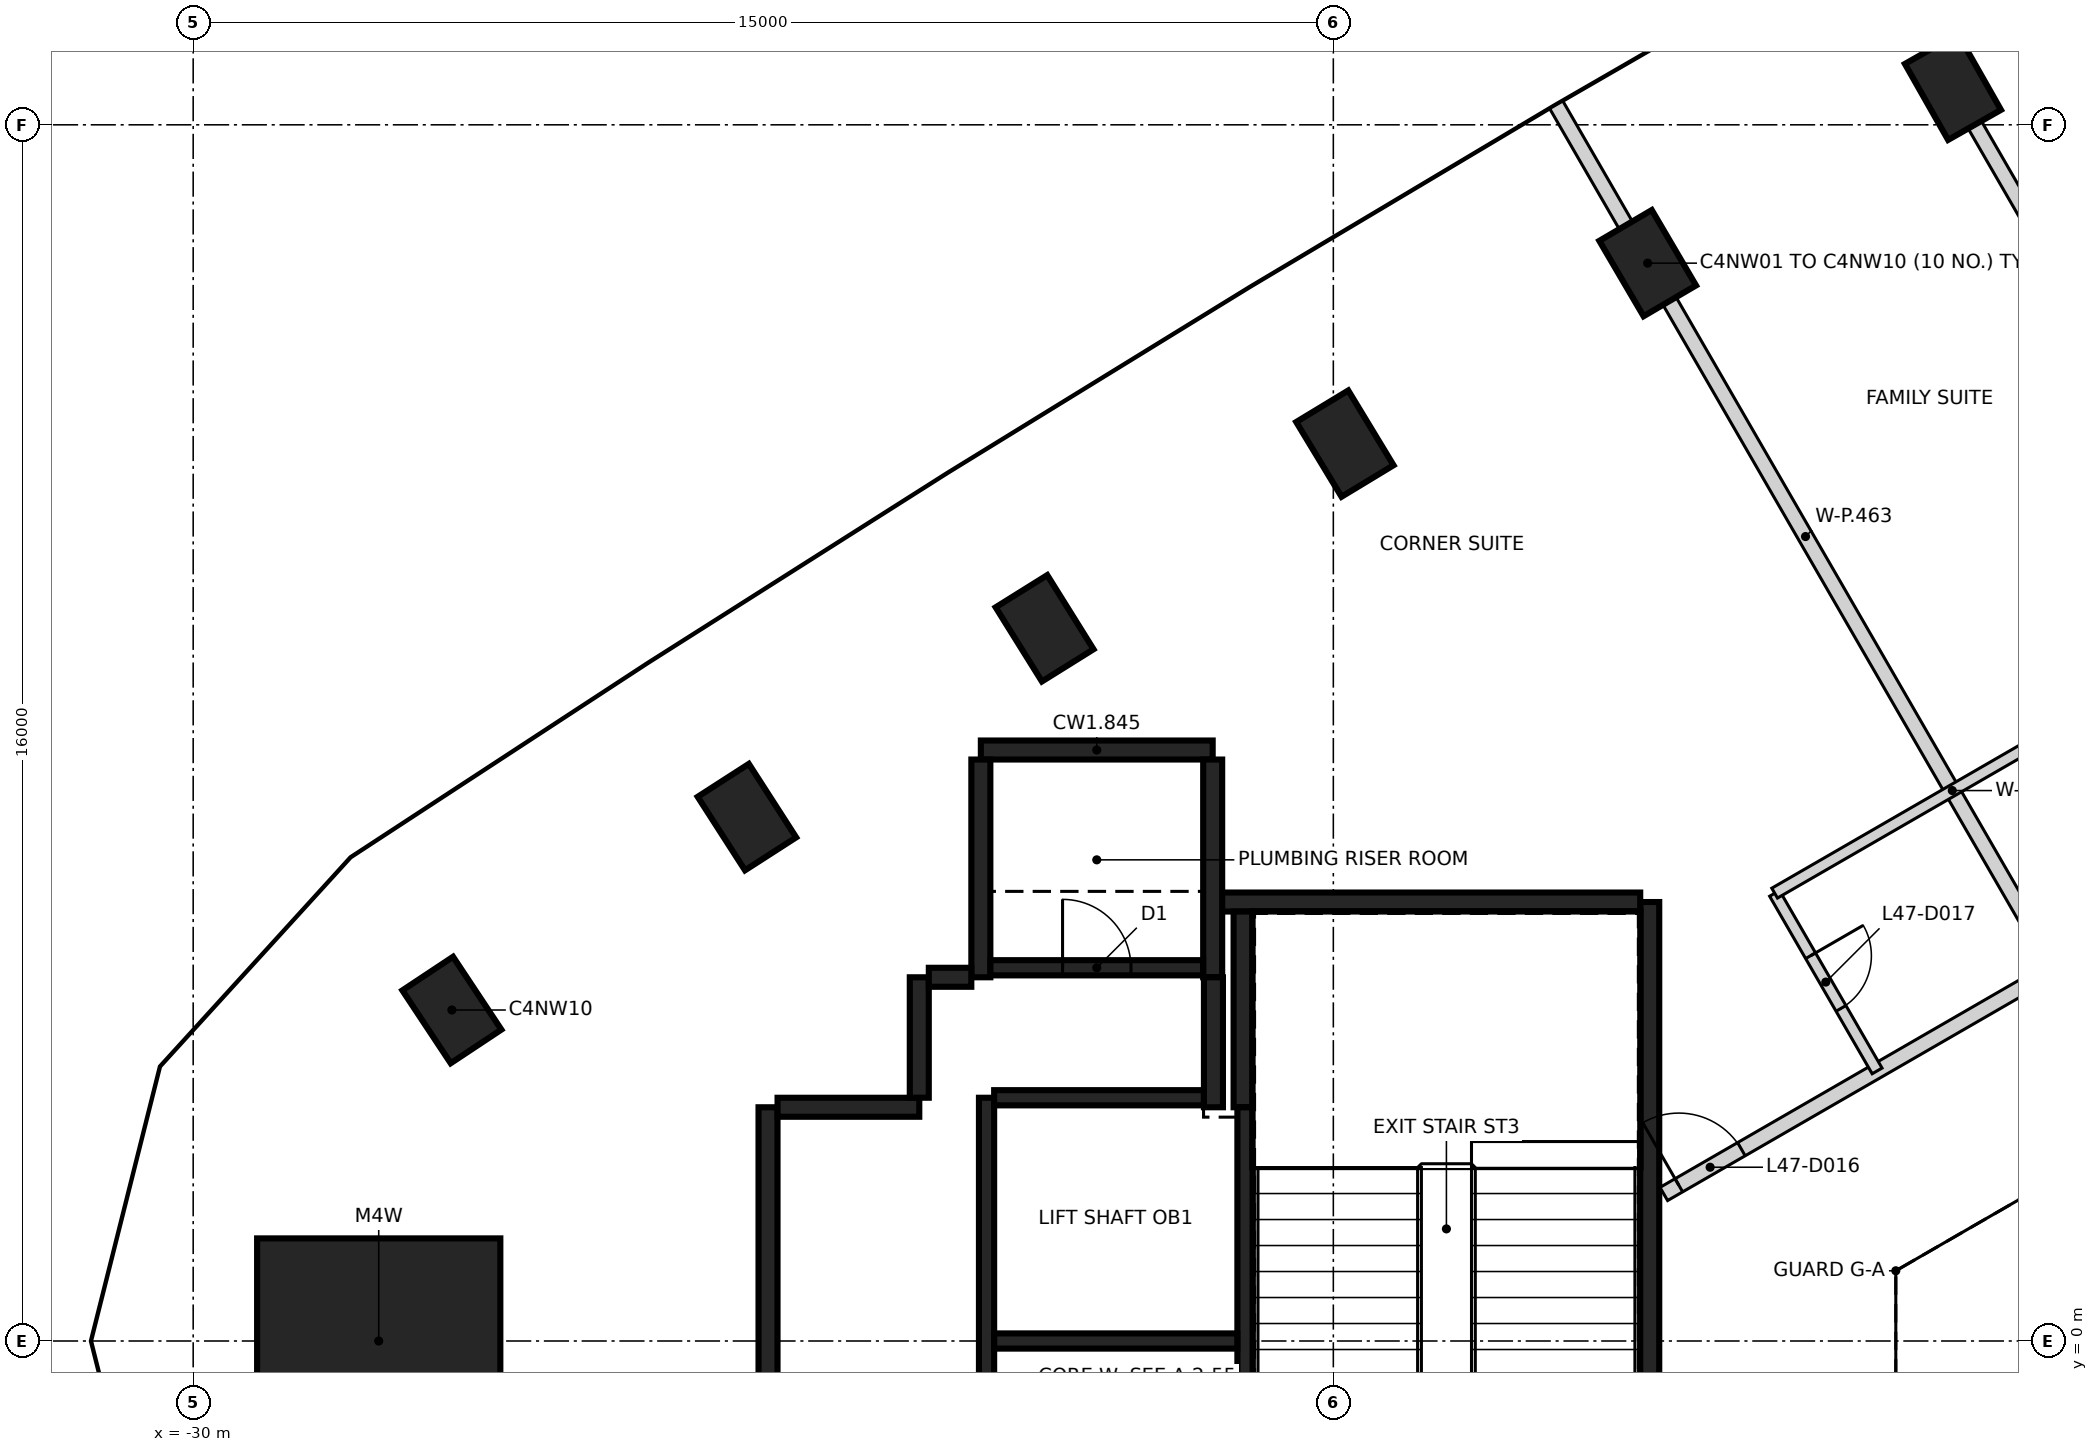
"""IFC4 building model, lengths in metres.
Left out: names, types, materials, properties, quantities, classifications, styles, units other than length and angle.
Written with IfcOpenShell. Run it as: python <this file> out.ifc"""

import sys

from ifc_helpers import new_model, si_unit, direction, frame, frame_2d, origin, origin_2d, place, context, subcontext, project, spatial, rectangle, extrude, element, fill, save


model = new_model("IFC4")
c1 = context("Model", 3, precision=1e-05, world=origin(), true_north=direction((0.0, 1.0)))
c2 = subcontext(c1, "Body", "Model", "MODEL_VIEW")
j1 = project(units=[si_unit("LENGTHUNIT", "METRE"), si_unit("PLANEANGLEUNIT", "RADIAN")], contexts=[c1])
p1 = place(None, origin())
s1 = spatial("IfcSite", under=j1, at=p1, CompositionType="ELEMENT")
p2 = place(p1, origin())
s2 = spatial("IfcBuilding", under=s1, at=p2, CompositionType="ELEMENT")
p3 = place(p2, frame((0.0, 0.0, 190.0)))
s3 = spatial("IfcBuildingStorey", under=s2, at=p3, CompositionType="ELEMENT", Elevation=190.0)
for number, where, z_axis, x_axis in (
    (1, (-6.848, 16.499, -0.35), (0.0, 0.0, 1.0), (-0.494, 0.87, 0.0)),
    (2, (-10.864, 14.18, -0.35), (0.0, 0.0, 1.0), (-0.506, 0.862, 0.0)),
    (3, (-14.848, 11.806, -0.35), (0.0, 0.0, 1.0), (-0.518, 0.855, 0.0)),
    (4, (-18.799, 9.376, -0.35), (0.0, 0.0, 1.0), (-0.529, 0.848, 0.0)),
    (5, (-22.715, 6.892, -0.35), (0.0, 0.0, 1.0), (-0.541, 0.841, 0.0)),
    (6, (-26.597, 4.354, -0.35), (0.0, 0.0, 1.0), (-0.553, 0.833, 0.0)),
):
    element("IfcColumn", number, at=place(p3, frame(where, z_axis=z_axis, x_axis=x_axis)), inside=s3, PredefinedType="COLUMN", context=c2, shape_type="SweptSolid", body=[
        extrude(rectangle(XDim=1.15, YDim=0.8, at=origin_2d()), origin(), (0.0, 0.0, 1.0), 3.6),
    ])
p4 = place(p3, frame((-27.559, 0.0, -0.35), z_axis=(0.0, 0.0, 1.0), x_axis=(1.0, 0.0, 0.0)))
e7 = element("IfcColumn", 7, at=p4, inside=s3, PredefinedType="COLUMN", context=c2, shape_type="SweptSolid", body=[
    extrude(rectangle(XDim=3.2, YDim=2.7, at=origin_2d()), origin(), (0.0, 0.0, 1.0), 3.6),
])
p5 = place(p3, frame((-10.837, 5.775, 0.0), z_axis=(0.0, 0.0, 1.0), x_axis=(0.0, -1.0, 0.0)))
e8 = element("IfcWall", 8, at=p5, inside=s3, PredefinedType="SHEAR", context=c2, shape_type="SweptSolid", body=[
    extrude(rectangle(XDim=11.55, YDim=0.25, at=frame_2d((5.775, 0.0))), origin(), (0.0, 0.0, 1.0), 3.25),
])
p6 = place(p5, frame((10.025, 0.0, 0.0)))
e9 = element("IfcOpeningElement", 9, at=p6, cuts=e8, PredefinedType="OPENING", context=c2, shape_type="SweptSolid", body=[
    extrude(rectangle(XDim=1.2, YDim=2.1, at=frame_2d((0.6, 1.05))), frame((0.0, 0.135, 0.0), z_axis=(0.0, -1.0, 0.0), x_axis=(1.0, 0.0, 0.0)), (0.0, 0.0, 1.0), 0.27),
])
p7 = place(p5, frame((8.725, 0.0, 0.0)))
e10 = element("IfcOpeningElement", 10, at=p7, cuts=e8, PredefinedType="OPENING", context=c2, shape_type="SweptSolid", body=[
    extrude(rectangle(XDim=1.2, YDim=2.1, at=frame_2d((0.6, 1.05))), frame((0.0, 0.135, 0.0), z_axis=(0.0, -1.0, 0.0), x_axis=(1.0, 0.0, 0.0)), (0.0, 0.0, 1.0), 0.27),
])
p8 = place(p3, frame((-22.437, -5.675, 0.0), z_axis=(0.0, 0.0, 1.0), x_axis=(0.0, 1.0, 0.0)))
e11 = element("IfcWall", 11, at=p8, inside=s3, PredefinedType="SHEAR", context=c2, shape_type="SweptSolid", body=[
    extrude(rectangle(XDim=8.75, YDim=0.25, at=frame_2d((4.375, 0.0))), origin(), (0.0, 0.0, 1.0), 3.25),
])
p9 = place(p3, frame((-16.472, 5.775, 0.0), z_axis=(0.0, 0.0, 1.0), x_axis=(1.0, 0.0, 0.0)))
e12 = element("IfcWall", 12, at=p9, inside=s3, PredefinedType="SHEAR", context=c2, shape_type="SweptSolid", body=[
    extrude(rectangle(XDim=5.51, YDim=0.25, at=frame_2d((2.755, 0.0))), origin(), (0.0, 0.0, 1.0), 3.25),
])
p10 = place(p3, frame((-19.637, 7.775, 0.0), z_axis=(0.0, 0.0, 1.0), x_axis=(1.0, 0.0, 0.0)))
e13 = element("IfcWall", 13, at=p10, inside=s3, PredefinedType="SHEAR", context=c2, shape_type="SweptSolid", body=[
    extrude(rectangle(XDim=3.05, YDim=0.25, at=frame_2d((1.525, 0.0))), origin(), (0.0, 0.0, 1.0), 3.25),
])
for number, where, z_axis, x_axis in (
    (14, (-16.587, 7.65, 0.0), (0.0, 0.0, 1.0), (0.0, -1.0, 0.0)),
    (15, (-19.637, 4.785, 0.0), (0.0, 0.0, 1.0), (0.0, 1.0, 0.0)),
):
    element("IfcWall", number, at=place(p3, frame(where, z_axis=z_axis, x_axis=x_axis)), inside=s3, PredefinedType="SHEAR", context=c2, shape_type="SweptSolid", body=[
        extrude(rectangle(XDim=2.865, YDim=0.25, at=frame_2d((1.432, 0.0))), origin(), (0.0, 0.0, 1.0), 3.25),
    ])
p11 = place(p3, frame((-16.187, 3.075, 0.0), z_axis=(0.0, 0.0, 1.0), x_axis=(0.0, 1.0, 0.0)))
e16 = element("IfcWall", 16, at=p11, inside=s3, PredefinedType="SHEAR", context=c2, shape_type="SweptSolid", body=[
    extrude(rectangle(XDim=2.575, YDim=0.25, at=frame_2d((1.287, 0.0))), origin(), (0.0, 0.0, 1.0), 3.25),
])
p12 = place(p3, frame((-22.312, 3.075, 0.0), z_axis=(0.0, 0.0, 1.0), x_axis=(1.0, 0.0, 0.0)))
e17 = element("IfcWall", 17, at=p12, inside=s3, PredefinedType="SHEAR", context=c2, shape_type="SweptSolid", body=[
    extrude(rectangle(XDim=1.865, YDim=0.25, at=frame_2d((0.932, 0.0))), origin(), (0.0, 0.0, 1.0), 3.25),
])
p13 = place(p3, frame((-16.577, 4.785, 0.0), z_axis=(0.0, 0.0, 1.0), x_axis=(0.0, -1.0, 0.0)))
e18 = element("IfcWall", 18, at=p13, inside=s3, PredefinedType="SHEAR", context=c2, shape_type="SweptSolid", body=[
    extrude(rectangle(XDim=1.71, YDim=0.25, at=frame_2d((0.855, 0.0))), origin(), (0.0, 0.0, 1.0), 3.25),
])
p14 = place(p3, frame((-20.447, 3.2, 0.0), z_axis=(0.0, 0.0, 1.0), x_axis=(0.0, 1.0, 0.0)))
e19 = element("IfcWall", 19, at=p14, inside=s3, PredefinedType="SHEAR", context=c2, shape_type="SweptSolid", body=[
    extrude(rectangle(XDim=1.584, YDim=0.25, at=frame_2d((0.792, 0.0))), origin(), (0.0, 0.0, 1.0), 3.25),
])
p15 = place(p3, frame((-20.322, 4.785, 0.0), z_axis=(0.0, 0.0, 1.0), x_axis=(1.0, 0.0, 0.0)))
e20 = element("IfcWall", 20, at=p15, inside=s3, PredefinedType="SHEAR", context=c2, shape_type="SweptSolid", body=[
    extrude(rectangle(XDim=0.559, YDim=0.25, at=frame_2d((0.28, 0.0))), origin(), (0.0, 0.0, 1.0), 3.25),
])
p16 = place(p3, frame((-16.162, 3.074, 0.0), z_axis=(0.0, 0.0, 1.0), x_axis=(0.0, -1.0, 0.0)))
e21 = element("IfcWall", 21, at=p16, inside=s3, PredefinedType="SHEAR", context=c2, shape_type="SweptSolid", body=[
    extrude(rectangle(XDim=5.974, YDim=0.2, at=frame_2d((2.987, 0.0))), origin(), (0.0, 0.0, 1.0), 3.25),
])
p17 = place(p3, frame((-19.562, -2.9, 0.0), z_axis=(0.0, 0.0, 1.0), x_axis=(0.0, 1.0, 0.0)))
e22 = element("IfcWall", 22, at=p17, inside=s3, PredefinedType="SHEAR", context=c2, shape_type="SweptSolid", body=[
    extrude(rectangle(XDim=6.1, YDim=0.2, at=frame_2d((3.05, 0.0))), origin(), (0.0, 0.0, 1.0), 3.25),
])
p18 = place(p3, frame((-16.263, 0.0, 0.0), z_axis=(0.0, 0.0, 1.0), x_axis=(-1.0, 0.0, 0.0)))
e23 = element("IfcWall", 23, at=p18, inside=s3, PredefinedType="SHEAR", context=c2, shape_type="SweptSolid", body=[
    extrude(rectangle(XDim=3.198, YDim=0.2, at=frame_2d((1.599, 0.0))), origin(), (0.0, 0.0, 1.0), 3.25),
])
p19 = place(p3, frame((-19.511, 4.91, 0.0), z_axis=(0.0, 0.0, 1.0), x_axis=(1.0, 0.0, 0.0)))
e24 = element("IfcWall", 24, at=p19, inside=s3, PredefinedType="SHEAR", context=c2, shape_type="SweptSolid", body=[
    extrude(rectangle(XDim=2.798, YDim=0.2, at=frame_2d((1.399, 0.0))), origin(), (0.0, 0.0, 1.0), 3.25),
])
p20 = place(p19, frame((0.949, 0.0, 0.0)))
e25 = element("IfcOpeningElement", 25, at=p20, cuts=e24, PredefinedType="OPENING", context=c2, shape_type="SweptSolid", body=[
    extrude(rectangle(XDim=0.9, YDim=2.1, at=frame_2d((0.45, 1.05))), frame((0.0, 0.11, 0.0), z_axis=(0.0, -1.0, 0.0), x_axis=(1.0, 0.0, 0.0)), (0.0, 0.0, 1.0), 0.22),
])
p21 = place(p3, frame((-19.462, 3.2, 0.0), z_axis=(0.0, 0.0, 1.0), x_axis=(1.0, 0.0, 0.0)))
e26 = element("IfcWall", 26, at=p21, inside=s3, PredefinedType="SHEAR", context=c2, shape_type="SweptSolid", body=[
    extrude(rectangle(XDim=2.759, YDim=0.2, at=frame_2d((1.379, 0.0))), origin(), (0.0, 0.0, 1.0), 3.25),
])
p22 = place(p3, frame((-10.652, 1.934, 0.0), z_axis=(0.0, 0.0, 1.0), x_axis=(0.866066882415, 0.499928150021, 0.0)))
e27 = element("IfcWall", 27, at=p22, inside=s3, PredefinedType="PARTITIONING", context=c2, shape_type="SweptSolid", body=[
    extrude(rectangle(XDim=12.98, YDim=0.2, at=frame_2d((6.49, 0.0))), origin(), (0.0, 0.0, 1.0), 3.25),
])
p23 = place(p22, frame((9.439, 0.0, 0.0)))
e28 = element("IfcOpeningElement", 28, at=p23, cuts=e27, PredefinedType="OPENING", context=c2, shape_type="SweptSolid", body=[
    extrude(rectangle(XDim=0.95, YDim=2.1, at=frame_2d((0.475, 1.05))), frame((0.0, 0.11, 0.0), z_axis=(0.0, -1.0, 0.0), x_axis=(1.0, 0.0, 0.0)), (0.0, 0.0, 1.0), 0.22),
])
p24 = place(p22, frame((0.229, 0.0, 0.0)))
e29 = element("IfcOpeningElement", 29, at=p24, cuts=e27, PredefinedType="OPENING", context=c2, shape_type="SweptSolid", body=[
    extrude(rectangle(XDim=0.95, YDim=2.1, at=frame_2d((0.475, 1.05))), frame((0.0, 0.11, 0.0), z_axis=(0.0, -1.0, 0.0), x_axis=(1.0, 0.0, 0.0)), (0.0, 0.0, 1.0), 0.22),
])
p25 = place(p3, frame((-12.067, 16.263, 0.0), z_axis=(0.0, 0.0, 1.0), x_axis=(0.500016190239, -0.866016056144, 0.0)))
e30 = element("IfcWall", 30, at=p25, inside=s3, PredefinedType="PARTITIONING", context=c2, shape_type="SweptSolid", body=[
    extrude(rectangle(XDim=13.118, YDim=0.2, at=frame_2d((6.559, 0.0))), origin(), (0.0, 0.0, 1.0), 3.25),
])
p26 = place(p3, frame((-8.052, 18.582, 0.0), z_axis=(0.0, 0.0, 1.0), x_axis=(0.500046266189, -0.86599869034, 0.0)))
e31 = element("IfcWall", 31, at=p26, inside=s3, PredefinedType="PARTITIONING", context=c2, shape_type="SweptSolid", body=[
    extrude(rectangle(XDim=13.118, YDim=0.2, at=frame_2d((6.559, 0.0))), origin(), (0.0, 0.0, 1.0), 3.25),
])
p27 = place(p3, frame((-9.195, 5.889, 0.0), z_axis=(0.0, 0.0, 1.0), x_axis=(0.500129820725, -0.865950438779, 0.0)))
e32 = element("IfcWall", 32, at=p27, inside=s3, PredefinedType="PARTITIONING", context=c2, shape_type="SweptSolid", body=[
    extrude(rectangle(XDim=2.698, YDim=0.15, at=frame_2d((1.349, 0.0))), origin(), (0.0, 0.0, 1.0), 3.25),
])
p28 = place(p27, frame((0.948, 0.0, 0.0)))
e33 = element("IfcOpeningElement", 33, at=p28, cuts=e32, PredefinedType="OPENING", context=c2, shape_type="SweptSolid", body=[
    extrude(rectangle(XDim=0.8, YDim=2.1, at=frame_2d((0.4, 1.05))), frame((0.0, 0.085, 0.0), z_axis=(0.0, -1.0, 0.0), x_axis=(1.0, 0.0, 0.0)), (0.0, 0.0, 1.0), 0.17),
])
p29 = place(p3, frame((-9.194, 5.892, 0.0), z_axis=(0.0, 0.0, 1.0), x_axis=(0.8659934935, 0.500055266161, 0.0)))
e34 = element("IfcWall", 34, at=p29, inside=s3, PredefinedType="PARTITIONING", context=c2, shape_type="SweptSolid", body=[
    extrude(rectangle(XDim=5.397, YDim=0.15, at=frame_2d((2.699, 0.0))), origin(), (0.0, 0.0, 1.0), 3.25),
])
p30 = place(p20, origin())
e35 = element("IfcDoor", 35, at=p30, inside=s3, OperationType="SINGLE_SWING_LEFT", PredefinedType="DOOR", context=c2, shape_type="SweptSolid", body=[
    extrude(rectangle(XDim=0.9, YDim=2.1, at=frame_2d((0.45, 1.05))), frame((0.0, 0.025, 0.0), z_axis=(0.0, -1.0, 0.0), x_axis=(1.0, 0.0, 0.0)), (0.0, 0.0, 1.0), 0.05),
])
fill(e25, e35)
p31 = place(p24, origin())
e36 = element("IfcDoor", 36, at=p31, inside=s3, OperationType="SINGLE_SWING_LEFT", PredefinedType="DOOR", context=c2, shape_type="SweptSolid", body=[
    extrude(rectangle(XDim=0.95, YDim=2.1, at=frame_2d((0.475, 1.05))), frame((0.0, 0.025, 0.0), z_axis=(0.0, -1.0, 0.0), x_axis=(1.0, 0.0, 0.0)), (0.0, 0.0, 1.0), 0.05),
])
fill(e29, e36)
p32 = place(p28, frame((0.8, 0.0, 0.0), z_axis=(0.0, 0.0, 1.0), x_axis=(-1.0, 0.0, 0.0)))
e37 = element("IfcDoor", 37, at=p32, inside=s3, OperationType="SINGLE_SWING_LEFT", PredefinedType="DOOR", context=c2, shape_type="SweptSolid", body=[
    extrude(rectangle(XDim=0.8, YDim=2.1, at=frame_2d((0.4, 1.05))), frame((0.0, 0.025, 0.0), z_axis=(0.0, -1.0, 0.0), x_axis=(1.0, 0.0, 0.0)), (0.0, 0.0, 1.0), 0.05),
])
fill(e33, e37)
save(model, sys.argv[1])
